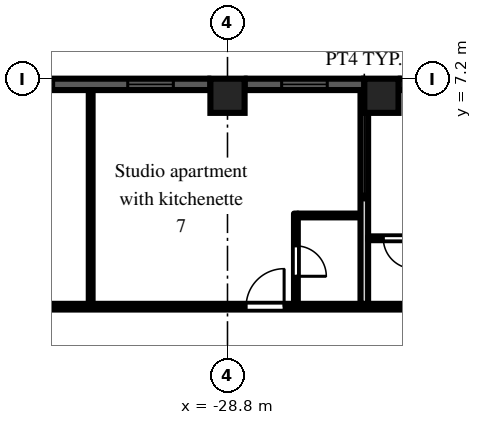
"""IFC4 building model, lengths in metres.
Left out: names, types, materials, properties, quantities, classifications, styles, units other than length and angle.
Written with IfcOpenShell. Run it as: python <this file> out.ifc"""

import sys

from ifc_helpers import new_model, si_unit, direction, frame, frame_2d, origin, origin_2d, place, context, subcontext, project, spatial, rectangle, extrude, element, fill, save


model = new_model("IFC4")
c1 = context("Model", 3, precision=1e-05, world=origin(), true_north=direction((0.0, 1.0)))
c2 = subcontext(c1, "Body", "Model", "MODEL_VIEW")
j1 = project(units=[si_unit("LENGTHUNIT", "METRE"), si_unit("PLANEANGLEUNIT", "RADIAN")], contexts=[c1])
p1 = place(None, origin())
s1 = spatial("IfcSite", under=j1, at=p1, CompositionType="ELEMENT")
p2 = place(p1, origin())
s2 = spatial("IfcBuilding", under=s1, at=p2, CompositionType="ELEMENT")
p3 = place(p2, frame((0.0, 0.0, 69.9)))
s3 = spatial("IfcBuildingStorey", under=s2, at=p3, CompositionType="ELEMENT", Elevation=69.9)
for number, where, z_axis, x_axis in (
    (1, (-28.8, 6.75, 0.0), (0.0, 0.0, 1.0), (1.0, 0.0, 0.0)),
    (2, (-24.75, 6.75, 0.0), (0.0, 0.0, 1.0), (1.0, 0.0, 0.0)),
):
    element("IfcColumn", number, at=place(p3, frame(where, z_axis=z_axis, x_axis=x_axis)), inside=s3, PredefinedType="COLUMN", context=c2, shape_type="SweptSolid", body=[
        extrude(rectangle(XDim=0.9, YDim=0.9, at=origin_2d()), origin(), (0.0, 0.0, 1.0), 3.0),
    ])
p4 = place(p3, frame((-21.6, 7.05, 0.0), z_axis=(0.0, 0.0, 1.0), x_axis=(-1.0, 0.0, 0.0)))
e3 = element("IfcWall", 3, at=p4, inside=s3, PredefinedType="SOLIDWALL", context=c2, shape_type="SweptSolid", body=[
    extrude(rectangle(XDim=2.7, YDim=0.3, at=frame_2d((1.35, 0.0))), origin(), (0.0, 0.0, 1.0), 2.1),
])
p5 = place(p4, frame((0.75, 0.0, 0.2)))
e4 = element("IfcOpeningElement", 4, at=p5, cuts=e3, PredefinedType="OPENING", context=c2, shape_type="SweptSolid", body=[
    extrude(rectangle(XDim=1.2, YDim=1.85, at=frame_2d((0.6, 0.925))), frame((0.0, 0.16, 0.0), z_axis=(0.0, -1.0, 0.0), x_axis=(1.0, 0.0, 0.0)), (0.0, 0.0, 1.0), 0.32),
])
p6 = place(p3, frame((-25.2, 7.05, 0.0), z_axis=(0.0, 0.0, 1.0), x_axis=(-1.0, 0.0, 0.0)))
e5 = element("IfcWall", 5, at=p6, inside=s3, PredefinedType="SOLIDWALL", context=c2, shape_type="SweptSolid", body=[
    extrude(rectangle(XDim=3.15, YDim=0.3, at=frame_2d((1.575, 0.0))), origin(), (0.0, 0.0, 1.0), 2.1),
])
p7 = place(p6, frame((0.975, 0.0, 0.2)))
e6 = element("IfcOpeningElement", 6, at=p7, cuts=e5, PredefinedType="OPENING", context=c2, shape_type="SweptSolid", body=[
    extrude(rectangle(XDim=1.2, YDim=1.85, at=frame_2d((0.6, 0.925))), frame((0.0, 0.16, 0.0), z_axis=(0.0, -1.0, 0.0), x_axis=(1.0, 0.0, 0.0)), (0.0, 0.0, 1.0), 0.32),
])
p8 = place(p3, frame((-29.25, 7.05, 0.0), z_axis=(0.0, 0.0, 1.0), x_axis=(-1.0, 0.0, 0.0)))
e7 = element("IfcWall", 7, at=p8, inside=s3, PredefinedType="SOLIDWALL", context=c2, shape_type="SweptSolid", body=[
    extrude(rectangle(XDim=6.3, YDim=0.3, at=frame_2d((3.15, 0.0))), origin(), (0.0, 0.0, 1.0), 2.1),
])
p9 = place(p8, frame((0.975, 0.0, 0.2)))
e8 = element("IfcOpeningElement", 8, at=p9, cuts=e7, PredefinedType="OPENING", context=c2, shape_type="SweptSolid", body=[
    extrude(rectangle(XDim=1.2, YDim=1.85, at=frame_2d((0.6, 0.925))), frame((0.0, 0.16, 0.0), z_axis=(0.0, -1.0, 0.0), x_axis=(1.0, 0.0, 0.0)), (0.0, 0.0, 1.0), 0.32),
])
p10 = place(p8, frame((4.125, 0.0, 0.2)))
e9 = element("IfcOpeningElement", 9, at=p10, cuts=e7, PredefinedType="OPENING", context=c2, shape_type="SweptSolid", body=[
    extrude(rectangle(XDim=1.2, YDim=1.85, at=frame_2d((0.6, 0.925))), frame((0.0, 0.16, 0.0), z_axis=(0.0, -1.0, 0.0), x_axis=(1.0, 0.0, 0.0)), (0.0, 0.0, 1.0), 0.32),
])
p11 = place(p3, frame((-36.5, 1.2, 0.0), z_axis=(0.0, 0.0, 1.0), x_axis=(1.0, 0.0, 0.0)))
e10 = element("IfcWall", 10, at=p11, inside=s3, PredefinedType="PARTITIONING", context=c2, shape_type="SweptSolid", body=[
    extrude(rectangle(XDim=14.9, YDim=0.15, at=frame_2d((7.45, 0.0))), origin(), (0.0, 0.0, 1.0), 2.575),
])
p12 = place(p11, frame((13.7, 0.0, 0.0)))
e11 = element("IfcOpeningElement", 11, at=p12, cuts=e10, PredefinedType="OPENING", context=c2, shape_type="SweptSolid", body=[
    extrude(rectangle(XDim=1.0, YDim=2.1, at=frame_2d((0.5, 1.05))), frame((0.0, 0.085, 0.0), z_axis=(0.0, -1.0, 0.0), x_axis=(1.0, 0.0, 0.0)), (0.0, 0.0, 1.0), 0.17),
])
p13 = place(p11, frame((8.19, 0.0, 0.0)))
e12 = element("IfcOpeningElement", 12, at=p13, cuts=e10, PredefinedType="OPENING", context=c2, shape_type="SweptSolid", body=[
    extrude(rectangle(XDim=1.0, YDim=2.1, at=frame_2d((0.5, 1.05))), frame((0.0, 0.085, 0.0), z_axis=(0.0, -1.0, 0.0), x_axis=(1.0, 0.0, 0.0)), (0.0, 0.0, 1.0), 0.17),
])
p14 = place(p11, frame((1.15, 0.0, 0.0)))
e13 = element("IfcOpeningElement", 13, at=p14, cuts=e10, PredefinedType="OPENING", context=c2, shape_type="SweptSolid", body=[
    extrude(rectangle(XDim=1.8, YDim=2.1, at=frame_2d((0.9, 1.05))), frame((0.0, 0.085, 0.0), z_axis=(0.0, -1.0, 0.0), x_axis=(1.0, 0.0, 0.0)), (0.0, 0.0, 1.0), 0.17),
])
p15 = place(p3, frame((-32.4, 1.275, 0.0), z_axis=(0.0, 0.0, 1.0), x_axis=(0.0, 1.0, 0.0)))
e14 = element("IfcWall", 14, at=p15, inside=s3, PredefinedType="PARTITIONING", context=c2, shape_type="SweptSolid", body=[
    extrude(rectangle(XDim=5.625, YDim=0.1, at=frame_2d((2.812, 0.0))), origin(), (0.0, 0.0, 1.0), 2.575),
])
p16 = place(p3, frame((-27.0, 1.275, 0.0), z_axis=(0.0, 0.0, 1.0), x_axis=(0.0, 1.0, 0.0)))
e15 = element("IfcWall", 15, at=p16, inside=s3, PredefinedType="PARTITIONING", context=c2, shape_type="SweptSolid", body=[
    extrude(rectangle(XDim=2.375, YDim=0.1, at=frame_2d((1.188, 0.0))), origin(), (0.0, 0.0, 1.0), 2.575),
])
p17 = place(p16, frame((0.725, 0.0, 0.0)))
e16 = element("IfcOpeningElement", 16, at=p17, cuts=e15, PredefinedType="OPENING", context=c2, shape_type="SweptSolid", body=[
    extrude(rectangle(XDim=0.8, YDim=2.1, at=frame_2d((0.4, 1.05))), frame((0.0, 0.06, 0.0), z_axis=(0.0, -1.0, 0.0), x_axis=(1.0, 0.0, 0.0)), (0.0, 0.0, 1.0), 0.12),
])
p18 = place(p3, frame((-26.95, 3.6, 0.0), z_axis=(0.0, 0.0, 1.0), x_axis=(1.0, 0.0, 0.0)))
e17 = element("IfcWall", 17, at=p18, inside=s3, PredefinedType="PARTITIONING", context=c2, shape_type="SweptSolid", body=[
    extrude(rectangle(XDim=1.65, YDim=0.1, at=frame_2d((0.825, 0.0))), origin(), (0.0, 0.0, 1.0), 2.575),
])
p19 = place(p3, frame((-25.2, 1.275, 0.0), z_axis=(0.0, 0.0, 1.0), x_axis=(0.0, 1.0, 0.0)))
e18 = element("IfcWall", 18, at=p19, inside=s3, PredefinedType="PARTITIONING", context=c2, shape_type="SweptSolid", body=[
    extrude(rectangle(XDim=5.625, YDim=0.2, at=frame_2d((2.812, 0.0))), origin(), (0.0, 0.0, 1.0), 2.575),
])
p20 = place(p3, frame((-25.1, 3.0, 0.0), z_axis=(0.0, 0.0, 1.0), x_axis=(1.0, 0.0, 0.0)))
e19 = element("IfcWall", 19, at=p20, inside=s3, PredefinedType="PARTITIONING", context=c2, shape_type="SweptSolid", body=[
    extrude(rectangle(XDim=1.75, YDim=0.1, at=frame_2d((0.875, 0.0))), origin(), (0.0, 0.0, 1.0), 2.575),
])
p21 = place(p20, frame((0.4, 0.0, 0.0)))
e20 = element("IfcOpeningElement", 20, at=p21, cuts=e19, PredefinedType="OPENING", context=c2, shape_type="SweptSolid", body=[
    extrude(rectangle(XDim=0.8, YDim=2.1, at=frame_2d((0.4, 1.05))), frame((0.0, 0.06, 0.0), z_axis=(0.0, -1.0, 0.0), x_axis=(1.0, 0.0, 0.0)), (0.0, 0.0, 1.0), 0.12),
])
p22 = place(p7, origin())
e21 = element("IfcWindow", 21, at=p22, inside=s3, PartitioningType="SINGLE_PANEL", PredefinedType="WINDOW", context=c2, shape_type="SweptSolid", body=[
    extrude(rectangle(XDim=1.2, YDim=1.85, at=frame_2d((0.6, 0.925))), frame((0.0, 0.03, 0.0), z_axis=(0.0, -1.0, 0.0), x_axis=(1.0, 0.0, 0.0)), (0.0, 0.0, 1.0), 0.06),
])
fill(e6, e21)
p23 = place(p9, origin())
e22 = element("IfcWindow", 22, at=p23, inside=s3, PartitioningType="SINGLE_PANEL", PredefinedType="WINDOW", context=c2, shape_type="SweptSolid", body=[
    extrude(rectangle(XDim=1.2, YDim=1.85, at=frame_2d((0.6, 0.925))), frame((0.0, 0.03, 0.0), z_axis=(0.0, -1.0, 0.0), x_axis=(1.0, 0.0, 0.0)), (0.0, 0.0, 1.0), 0.06),
])
fill(e8, e22)
p24 = place(p10, origin())
e23 = element("IfcWindow", 23, at=p24, inside=s3, PartitioningType="SINGLE_PANEL", PredefinedType="WINDOW", context=c2, shape_type="SweptSolid", body=[
    extrude(rectangle(XDim=1.2, YDim=1.85, at=frame_2d((0.6, 0.925))), frame((0.0, 0.03, 0.0), z_axis=(0.0, -1.0, 0.0), x_axis=(1.0, 0.0, 0.0)), (0.0, 0.0, 1.0), 0.06),
])
fill(e9, e23)
p25 = place(p21, frame((0.8, 0.0, 0.0), z_axis=(0.0, 0.0, 1.0), x_axis=(-1.0, 0.0, 0.0)))
e24 = element("IfcDoor", 24, at=p25, inside=s3, OperationType="SINGLE_SWING_LEFT", PredefinedType="DOOR", context=c2, shape_type="SweptSolid", body=[
    extrude(rectangle(XDim=0.8, YDim=2.1, at=frame_2d((0.4, 1.05))), frame((0.0, 0.025, 0.0), z_axis=(0.0, -1.0, 0.0), x_axis=(1.0, 0.0, 0.0)), (0.0, 0.0, 1.0), 0.05),
])
fill(e20, e24)
p26 = place(p17, frame((0.8, 0.0, 0.0), z_axis=(0.0, 0.0, 1.0), x_axis=(-1.0, 0.0, 0.0)))
e25 = element("IfcDoor", 25, at=p26, inside=s3, OperationType="SINGLE_SWING_RIGHT", PredefinedType="DOOR", context=c2, shape_type="SweptSolid", body=[
    extrude(rectangle(XDim=0.8, YDim=2.1, at=frame_2d((0.4, 1.05))), frame((0.0, 0.025, 0.0), z_axis=(0.0, -1.0, 0.0), x_axis=(1.0, 0.0, 0.0)), (0.0, 0.0, 1.0), 0.05),
])
fill(e16, e25)
p27 = place(p13, origin())
e26 = element("IfcDoor", 26, at=p27, inside=s3, OperationType="SINGLE_SWING_RIGHT", PredefinedType="DOOR", context=c2, shape_type="SweptSolid", body=[
    extrude(rectangle(XDim=1.0, YDim=2.1, at=frame_2d((0.5, 1.05))), frame((0.0, 0.025, 0.0), z_axis=(0.0, -1.0, 0.0), x_axis=(1.0, 0.0, 0.0)), (0.0, 0.0, 1.0), 0.05),
])
fill(e12, e26)
save(model, sys.argv[1])
